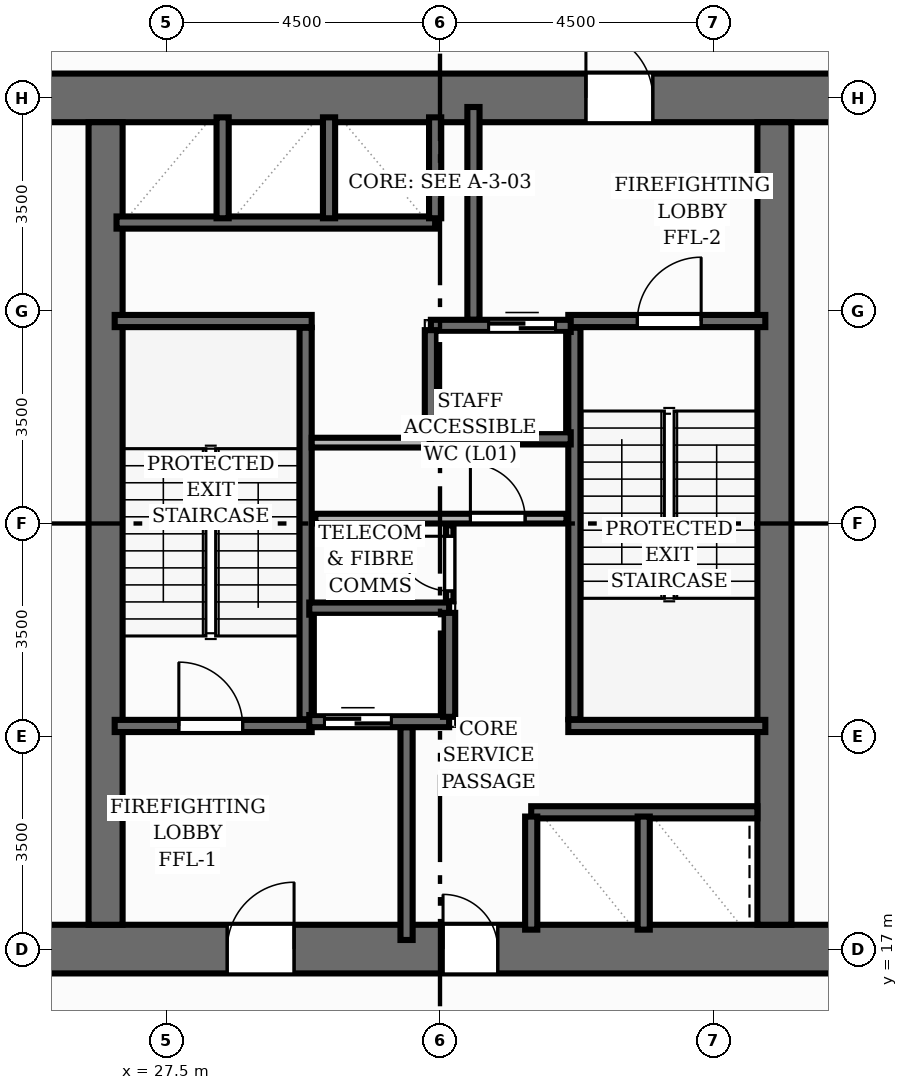
"""IFC4 building model, lengths in metres.
Left out: names, types, materials, properties, quantities, classifications, styles, units other than length and angle.
Written with IfcOpenShell. Run it as: python <this file> out.ifc"""

import sys

from ifc_helpers import new_model, si_unit, direction, frame, frame_2d, origin, place, context, subcontext, project, spatial, rectangle, extrude, element, fill, save


model = new_model("IFC4")
c1 = context("Model", 3, precision=1e-05, world=origin(), true_north=direction((0.0, 1.0)))
c2 = subcontext(c1, "Body", "Model", "MODEL_VIEW")
j1 = project(units=[si_unit("LENGTHUNIT", "METRE"), si_unit("PLANEANGLEUNIT", "RADIAN")], contexts=[c1])
p1 = place(None, origin())
s1 = spatial("IfcSite", under=j1, at=p1, CompositionType="ELEMENT")
p2 = place(p1, origin())
s2 = spatial("IfcBuilding", under=s1, at=p2, CompositionType="ELEMENT")
p3 = place(p2, frame((0.0, 0.0, 4.0)))
s3 = spatial("IfcBuildingStorey", under=s2, at=p3, CompositionType="ELEMENT", Elevation=4.0)
p4 = place(p3, frame((22.6, 17.0, 0.0), z_axis=(0.0, 0.0, 1.0), x_axis=(1.0, 0.0, 0.0)))
e1 = element("IfcWall", 1, at=p4, inside=s3, PredefinedType="SHEAR", context=c2, shape_type="SweptSolid", body=[
    extrude(rectangle(XDim=18.8, YDim=0.8, at=frame_2d((9.4, 0.0))), origin(), (0.0, 0.0, 1.0), 4.0),
])
p5 = place(p4, frame((5.9, 0.0, 0.0)))
e2 = element("IfcOpeningElement", 2, at=p5, cuts=e1, PredefinedType="OPENING", context=c2, shape_type="SweptSolid", body=[
    extrude(rectangle(XDim=1.1, YDim=2.15, at=frame_2d((0.55, 1.075))), frame((0.0, 0.41, 0.0), z_axis=(0.0, -1.0, 0.0), x_axis=(1.0, 0.0, 0.0)), (0.0, 0.0, 1.0), 0.82),
])
p6 = place(p4, frame((9.45, 0.0, 0.0)))
e3 = element("IfcOpeningElement", 3, at=p6, cuts=e1, PredefinedType="OPENING", context=c2, shape_type="SweptSolid", body=[
    extrude(rectangle(XDim=0.9, YDim=2.1, at=frame_2d((0.45, 1.05))), frame((0.0, 0.41, 0.0), z_axis=(0.0, -1.0, 0.0), x_axis=(1.0, 0.0, 0.0)), (0.0, 0.0, 1.0), 0.82),
])
p7 = place(p3, frame((22.6, 31.0, 0.0), z_axis=(0.0, 0.0, 1.0), x_axis=(1.0, 0.0, 0.0)))
e4 = element("IfcWall", 4, at=p7, inside=s3, PredefinedType="SHEAR", context=c2, shape_type="SweptSolid", body=[
    extrude(rectangle(XDim=18.8, YDim=0.8, at=frame_2d((9.4, 0.0))), origin(), (0.0, 0.0, 1.0), 4.0),
])
p8 = place(p7, frame((11.8, 0.0, 0.0)))
e5 = element("IfcOpeningElement", 5, at=p8, cuts=e4, PredefinedType="OPENING", context=c2, shape_type="SweptSolid", body=[
    extrude(rectangle(XDim=1.1, YDim=2.15, at=frame_2d((0.55, 1.075))), frame((0.0, 0.41, 0.0), z_axis=(0.0, -1.0, 0.0), x_axis=(1.0, 0.0, 0.0)), (0.0, 0.0, 1.0), 0.82),
])
for number, where, z_axis, x_axis in (
    (6, (26.5, 17.4, 0.0), (0.0, 0.0, 1.0), (0.0, 1.0, 0.0)),
    (7, (37.5, 17.4, 0.0), (0.0, 0.0, 1.0), (0.0, 1.0, 0.0)),
):
    element("IfcWall", number, at=place(p3, frame(where, z_axis=z_axis, x_axis=x_axis)), inside=s3, PredefinedType="SHEAR", context=c2, shape_type="SweptSolid", body=[
        extrude(rectangle(XDim=13.2, YDim=0.56, at=frame_2d((6.6, 0.0))), origin(), (0.0, 0.0, 1.0), 4.0),
    ])
p9 = place(p3, frame((29.79, 20.78, 0.0), z_axis=(0.0, 0.0, 1.0), x_axis=(0.0, 1.0, 0.0)))
e8 = element("IfcWall", 8, at=p9, inside=s3, PredefinedType="SHEAR", context=c2, shape_type="SweptSolid", body=[
    extrude(rectangle(XDim=6.44, YDim=0.2, at=frame_2d((3.22, 0.0))), origin(), (0.0, 0.0, 1.0), 4.0),
])
p10 = place(p3, frame((26.65, 27.33, 0.0), z_axis=(0.0, 0.0, 1.0), x_axis=(1.0, 0.0, 0.0)))
e9 = element("IfcWall", 9, at=p10, inside=s3, PredefinedType="SHEAR", context=c2, shape_type="SweptSolid", body=[
    extrude(rectangle(XDim=3.24, YDim=0.2, at=frame_2d((1.62, 0.0))), origin(), (0.0, 0.0, 1.0), 4.0),
])
p11 = place(p3, frame((26.65, 20.67, 0.0), z_axis=(0.0, 0.0, 1.0), x_axis=(1.0, 0.0, 0.0)))
e10 = element("IfcWall", 10, at=p11, inside=s3, PredefinedType="SHEAR", context=c2, shape_type="SweptSolid", body=[
    extrude(rectangle(XDim=3.24, YDim=0.2, at=frame_2d((1.62, 0.0))), origin(), (0.0, 0.0, 1.0), 4.0),
])
p12 = place(p11, frame((1.055, 0.0, 0.0)))
e11 = element("IfcOpeningElement", 11, at=p12, cuts=e10, PredefinedType="OPENING", context=c2, shape_type="SweptSolid", body=[
    extrude(rectangle(XDim=1.05, YDim=2.15, at=frame_2d((0.525, 1.075))), frame((0.0, 0.11, 0.0), z_axis=(0.0, -1.0, 0.0), x_axis=(1.0, 0.0, 0.0)), (0.0, 0.0, 1.0), 0.22),
])
p13 = place(p3, frame((34.21, 20.78, 0.0), z_axis=(0.0, 0.0, 1.0), x_axis=(0.0, 1.0, 0.0)))
e12 = element("IfcWall", 12, at=p13, inside=s3, PredefinedType="SHEAR", context=c2, shape_type="SweptSolid", body=[
    extrude(rectangle(XDim=6.44, YDim=0.2, at=frame_2d((3.22, 0.0))), origin(), (0.0, 0.0, 1.0), 4.0),
])
p14 = place(p3, frame((34.11, 20.67, 0.0), z_axis=(0.0, 0.0, 1.0), x_axis=(1.0, 0.0, 0.0)))
e13 = element("IfcWall", 13, at=p14, inside=s3, PredefinedType="SHEAR", context=c2, shape_type="SweptSolid", body=[
    extrude(rectangle(XDim=3.24, YDim=0.2, at=frame_2d((1.62, 0.0))), origin(), (0.0, 0.0, 1.0), 4.0),
])
p15 = place(p3, frame((34.11, 27.33, 0.0), z_axis=(0.0, 0.0, 1.0), x_axis=(1.0, 0.0, 0.0)))
e14 = element("IfcWall", 14, at=p15, inside=s3, PredefinedType="SHEAR", context=c2, shape_type="SweptSolid", body=[
    extrude(rectangle(XDim=3.24, YDim=0.2, at=frame_2d((1.62, 0.0))), origin(), (0.0, 0.0, 1.0), 4.0),
])
p16 = place(p15, frame((1.135, 0.0, 0.0)))
e15 = element("IfcOpeningElement", 15, at=p16, cuts=e14, PredefinedType="OPENING", context=c2, shape_type="SweptSolid", body=[
    extrude(rectangle(XDim=1.05, YDim=2.15, at=frame_2d((0.525, 1.075))), frame((0.0, 0.11, 0.0), z_axis=(0.0, -1.0, 0.0), x_axis=(1.0, 0.0, 0.0)), (0.0, 0.0, 1.0), 0.22),
])
for number, where, z_axis, x_axis in (
    (16, (31.45, 17.15, 0.0), (0.0, 0.0, 1.0), (0.0, 1.0, 0.0)),
    (17, (32.55, 27.35, 0.0), (0.0, 0.0, 1.0), (0.0, 1.0, 0.0)),
):
    element("IfcWall", number, at=place(p3, frame(where, z_axis=z_axis, x_axis=x_axis)), inside=s3, PredefinedType="SHEAR", context=c2, shape_type="SweptSolid", body=[
        extrude(rectangle(XDim=3.5, YDim=0.2, at=frame_2d((1.75, 0.0))), origin(), (0.0, 0.0, 1.0), 4.0),
    ])
p17 = place(p3, frame((29.85, 20.75, 0.0), z_axis=(0.0, 0.0, 1.0), x_axis=(1.0, 0.0, 0.0)))
e18 = element("IfcWall", 18, at=p17, inside=s3, PredefinedType="SHEAR", context=c2, shape_type="SweptSolid", body=[
    extrude(rectangle(XDim=2.3, YDim=0.2, at=frame_2d((1.15, 0.0))), origin(), (0.0, 0.0, 1.0), 4.0),
])
p18 = place(p17, frame((0.25, 0.0, 0.0)))
e19 = element("IfcOpeningElement", 19, at=p18, cuts=e18, PredefinedType="OPENING", context=c2, shape_type="SweptSolid", body=[
    extrude(rectangle(XDim=1.1, YDim=2.15, at=frame_2d((0.55, 1.075))), frame((0.0, 0.11, 0.0), z_axis=(0.0, -1.0, 0.0), x_axis=(1.0, 0.0, 0.0)), (0.0, 0.0, 1.0), 0.22),
])
p19 = place(p3, frame((29.85, 22.6, 0.0), z_axis=(0.0, 0.0, 1.0), x_axis=(1.0, 0.0, 0.0)))
e20 = element("IfcWall", 20, at=p19, inside=s3, PredefinedType="SHEAR", context=c2, shape_type="SweptSolid", body=[
    extrude(rectangle(XDim=2.3, YDim=0.2, at=frame_2d((1.15, 0.0))), origin(), (0.0, 0.0, 1.0), 4.0),
])
p20 = place(p3, frame((32.15, 20.82, 0.0), z_axis=(0.0, 0.0, 1.0), x_axis=(0.0, 1.0, 0.0)))
e21 = element("IfcWall", 21, at=p20, inside=s3, PredefinedType="SHEAR", context=c2, shape_type="SweptSolid", body=[
    extrude(rectangle(XDim=1.71, YDim=0.2, at=frame_2d((0.855, 0.0))), origin(), (0.0, 0.0, 1.0), 4.0),
])
p21 = place(p3, frame((31.85, 27.25, 0.0), z_axis=(0.0, 0.0, 1.0), x_axis=(1.0, 0.0, 0.0)))
e22 = element("IfcWall", 22, at=p21, inside=s3, PredefinedType="SHEAR", context=c2, shape_type="SweptSolid", body=[
    extrude(rectangle(XDim=2.3, YDim=0.2, at=frame_2d((1.15, 0.0))), origin(), (0.0, 0.0, 1.0), 4.0),
])
p22 = place(p21, frame((0.95, 0.0, 0.0)))
e23 = element("IfcOpeningElement", 23, at=p22, cuts=e22, PredefinedType="OPENING", context=c2, shape_type="SweptSolid", body=[
    extrude(rectangle(XDim=1.1, YDim=2.15, at=frame_2d((0.55, 1.075))), frame((0.0, 0.11, 0.0), z_axis=(0.0, -1.0, 0.0), x_axis=(1.0, 0.0, 0.0)), (0.0, 0.0, 1.0), 0.22),
])
p23 = place(p3, frame((31.85, 25.4, 0.0), z_axis=(0.0, 0.0, 1.0), x_axis=(1.0, 0.0, 0.0)))
e24 = element("IfcWall", 24, at=p23, inside=s3, PredefinedType="SHEAR", context=c2, shape_type="SweptSolid", body=[
    extrude(rectangle(XDim=2.3, YDim=0.2, at=frame_2d((1.15, 0.0))), origin(), (0.0, 0.0, 1.0), 4.0),
])
p24 = place(p3, frame((31.85, 25.47, 0.0), z_axis=(0.0, 0.0, 1.0), x_axis=(0.0, 1.0, 0.0)))
e25 = element("IfcWall", 25, at=p24, inside=s3, PredefinedType="SHEAR", context=c2, shape_type="SweptSolid", body=[
    extrude(rectangle(XDim=1.71, YDim=0.2, at=frame_2d((0.855, 0.0))), origin(), (0.0, 0.0, 1.0), 4.0),
])
p25 = place(p3, frame((26.68, 28.95, 0.0), z_axis=(0.0, 0.0, 1.0), x_axis=(1.0, 0.0, 0.0)))
e26 = element("IfcWall", 26, at=p25, inside=s3, PredefinedType="SHEAR", context=c2, shape_type="SweptSolid", body=[
    extrude(rectangle(XDim=5.24, YDim=0.2, at=frame_2d((2.62, 0.0))), origin(), (0.0, 0.0, 1.0), 4.0),
])
for number, where, z_axis, x_axis in (
    (27, (31.92, 29.02, 0.0), (0.0, 0.0, 1.0), (0.0, 1.0, 0.0)),
    (28, (28.425, 29.02, 0.0), (0.0, 0.0, 1.0), (0.0, 1.0, 0.0)),
    (29, (30.175, 29.02, 0.0), (0.0, 0.0, 1.0), (0.0, 1.0, 0.0)),
):
    element("IfcWall", number, at=place(p3, frame(where, z_axis=z_axis, x_axis=x_axis)), inside=s3, PredefinedType="SHEAR", context=c2, shape_type="SweptSolid", body=[
        extrude(rectangle(XDim=1.66, YDim=0.2, at=frame_2d((0.83, 0.0))), origin(), (0.0, 0.0, 1.0), 4.0),
    ])
p26 = place(p3, frame((33.5, 19.25, 0.0), z_axis=(0.0, 0.0, 1.0), x_axis=(1.0, 0.0, 0.0)))
e30 = element("IfcWall", 30, at=p26, inside=s3, PredefinedType="SHEAR", context=c2, shape_type="SweptSolid", body=[
    extrude(rectangle(XDim=3.72, YDim=0.2, at=frame_2d((1.86, 0.0))), origin(), (0.0, 0.0, 1.0), 4.0),
])
for number, where, z_axis, x_axis in (
    (31, (33.5, 17.32, 0.0), (0.0, 0.0, 1.0), (0.0, 1.0, 0.0)),
    (32, (35.35, 17.32, 0.0), (0.0, 0.0, 1.0), (0.0, 1.0, 0.0)),
):
    element("IfcWall", number, at=place(p3, frame(where, z_axis=z_axis, x_axis=x_axis)), inside=s3, PredefinedType="SHEAR", context=c2, shape_type="SweptSolid", body=[
        extrude(rectangle(XDim=1.86, YDim=0.2, at=frame_2d((0.93, 0.0))), origin(), (0.0, 0.0, 1.0), 4.0),
    ])
p27 = place(p3, frame((29.95, 24.08, 0.0), z_axis=(0.0, 0.0, 1.0), x_axis=(1.0, 0.0, 0.0)))
e33 = element("IfcWall", 33, at=p27, inside=s3, PredefinedType="PLUMBINGWALL", context=c2, shape_type="SweptSolid", body=[
    extrude(rectangle(XDim=4.13, YDim=0.16, at=frame_2d((2.065, 0.0))), origin(), (0.0, 0.0, 1.0), 3.715),
])
p28 = place(p27, frame((2.55, 0.0, 0.0)))
e34 = element("IfcOpeningElement", 34, at=p28, cuts=e33, PredefinedType="OPENING", context=c2, shape_type="SweptSolid", body=[
    extrude(rectangle(XDim=0.9, YDim=2.1, at=frame_2d((0.45, 1.05))), frame((0.0, 0.09, 0.0), z_axis=(0.0, -1.0, 0.0), x_axis=(1.0, 0.0, 0.0)), (0.0, 0.0, 1.0), 0.18),
])
p29 = place(p3, frame((32.16, 22.72, 0.0), z_axis=(0.0, 0.0, 1.0), x_axis=(0.0, 1.0, 0.0)))
e35 = element("IfcWall", 35, at=p29, inside=s3, PredefinedType="PARTITIONING", context=c2, shape_type="SweptSolid", body=[
    extrude(rectangle(XDim=1.25, YDim=0.125, at=frame_2d((0.625, 0.0))), origin(), (0.0, 0.0, 1.0), 3.715),
])
p30 = place(p29, frame((0.17, 0.0, 0.0)))
e36 = element("IfcOpeningElement", 36, at=p30, cuts=e35, PredefinedType="OPENING", context=c2, shape_type="SweptSolid", body=[
    extrude(rectangle(XDim=0.9, YDim=2.1, at=frame_2d((0.45, 1.05))), frame((0.0, 0.073, 0.0), z_axis=(0.0, -1.0, 0.0), x_axis=(1.0, 0.0, 0.0)), (0.0, 0.0, 1.0), 0.145),
])
p31 = place(p3, frame((29.89, 25.33, 0.0), z_axis=(0.0, 0.0, 1.0), x_axis=(1.0, 0.0, 0.0)))
e37 = element("IfcWall", 37, at=p31, inside=s3, PredefinedType="PLUMBINGWALL", context=c2, shape_type="SweptSolid", body=[
    extrude(rectangle(XDim=1.94, YDim=0.16, at=frame_2d((0.97, 0.0))), origin(), (0.0, 0.0, 1.0), 3.715),
])
p32 = place(p12, origin())
e38 = element("IfcDoor", 38, at=p32, inside=s3, OperationType="SINGLE_SWING_LEFT", PredefinedType="DOOR", context=c2, shape_type="SweptSolid", body=[
    extrude(rectangle(XDim=1.05, YDim=2.15, at=frame_2d((0.525, 1.075))), frame((0.0, 0.025, 0.0), z_axis=(0.0, -1.0, 0.0), x_axis=(1.0, 0.0, 0.0)), (0.0, 0.0, 1.0), 0.05),
])
fill(e11, e38)
p33 = place(p16, origin())
e39 = element("IfcDoor", 39, at=p33, inside=s3, OperationType="SINGLE_SWING_RIGHT", PredefinedType="DOOR", context=c2, shape_type="SweptSolid", body=[
    extrude(rectangle(XDim=1.05, YDim=2.15, at=frame_2d((0.525, 1.075))), frame((0.0, 0.025, 0.0), z_axis=(0.0, -1.0, 0.0), x_axis=(1.0, 0.0, 0.0)), (0.0, 0.0, 1.0), 0.05),
])
fill(e15, e39)
p34 = place(p5, origin())
e40 = element("IfcDoor", 40, at=p34, inside=s3, OperationType="SINGLE_SWING_RIGHT", PredefinedType="DOOR", context=c2, shape_type="SweptSolid", body=[
    extrude(rectangle(XDim=1.1, YDim=2.15, at=frame_2d((0.55, 1.075))), frame((0.0, 0.025, 0.0), z_axis=(0.0, -1.0, 0.0), x_axis=(1.0, 0.0, 0.0)), (0.0, 0.0, 1.0), 0.05),
])
fill(e2, e40)
p35 = place(p8, origin())
e41 = element("IfcDoor", 41, at=p35, inside=s3, OperationType="SINGLE_SWING_LEFT", PredefinedType="DOOR", context=c2, shape_type="SweptSolid", body=[
    extrude(rectangle(XDim=1.1, YDim=2.15, at=frame_2d((0.55, 1.075))), frame((0.0, 0.025, 0.0), z_axis=(0.0, -1.0, 0.0), x_axis=(1.0, 0.0, 0.0)), (0.0, 0.0, 1.0), 0.05),
])
fill(e5, e41)
p36 = place(p18, origin())
e42 = element("IfcDoor", 42, at=p36, inside=s3, OperationType="DOUBLE_DOOR_SLIDING", PredefinedType="DOOR", context=c2, shape_type="SweptSolid", body=[
    extrude(rectangle(XDim=1.1, YDim=2.15, at=frame_2d((0.55, 1.075))), frame((0.0, 0.025, 0.0), z_axis=(0.0, -1.0, 0.0), x_axis=(1.0, 0.0, 0.0)), (0.0, 0.0, 1.0), 0.05),
])
fill(e19, e42)
p37 = place(p22, origin())
e43 = element("IfcDoor", 43, at=p37, inside=s3, OperationType="DOUBLE_DOOR_SLIDING", PredefinedType="DOOR", context=c2, shape_type="SweptSolid", body=[
    extrude(rectangle(XDim=1.1, YDim=2.15, at=frame_2d((0.55, 1.075))), frame((0.0, 0.025, 0.0), z_axis=(0.0, -1.0, 0.0), x_axis=(1.0, 0.0, 0.0)), (0.0, 0.0, 1.0), 0.05),
])
fill(e23, e43)
p38 = place(p6, origin())
e44 = element("IfcDoor", 44, at=p38, inside=s3, OperationType="SINGLE_SWING_LEFT", PredefinedType="DOOR", context=c2, shape_type="SweptSolid", body=[
    extrude(rectangle(XDim=0.9, YDim=2.1, at=frame_2d((0.45, 1.05))), frame((0.0, 0.025, 0.0), z_axis=(0.0, -1.0, 0.0), x_axis=(1.0, 0.0, 0.0)), (0.0, 0.0, 1.0), 0.05),
])
fill(e3, e44)
p39 = place(p28, origin())
e45 = element("IfcDoor", 45, at=p39, inside=s3, OperationType="SINGLE_SWING_LEFT", PredefinedType="DOOR", context=c2, shape_type="SweptSolid", body=[
    extrude(rectangle(XDim=0.9, YDim=2.1, at=frame_2d((0.45, 1.05))), frame((0.0, 0.025, 0.0), z_axis=(0.0, -1.0, 0.0), x_axis=(1.0, 0.0, 0.0)), (0.0, 0.0, 1.0), 0.05),
])
fill(e34, e45)
p40 = place(p30, origin())
e46 = element("IfcDoor", 46, at=p40, inside=s3, OperationType="SINGLE_SWING_RIGHT", PredefinedType="DOOR", context=c2, shape_type="SweptSolid", body=[
    extrude(rectangle(XDim=0.9, YDim=2.1, at=frame_2d((0.45, 1.05))), frame((0.0, 0.025, 0.0), z_axis=(0.0, -1.0, 0.0), x_axis=(1.0, 0.0, 0.0)), (0.0, 0.0, 1.0), 0.05),
])
fill(e36, e46)
save(model, sys.argv[1])
